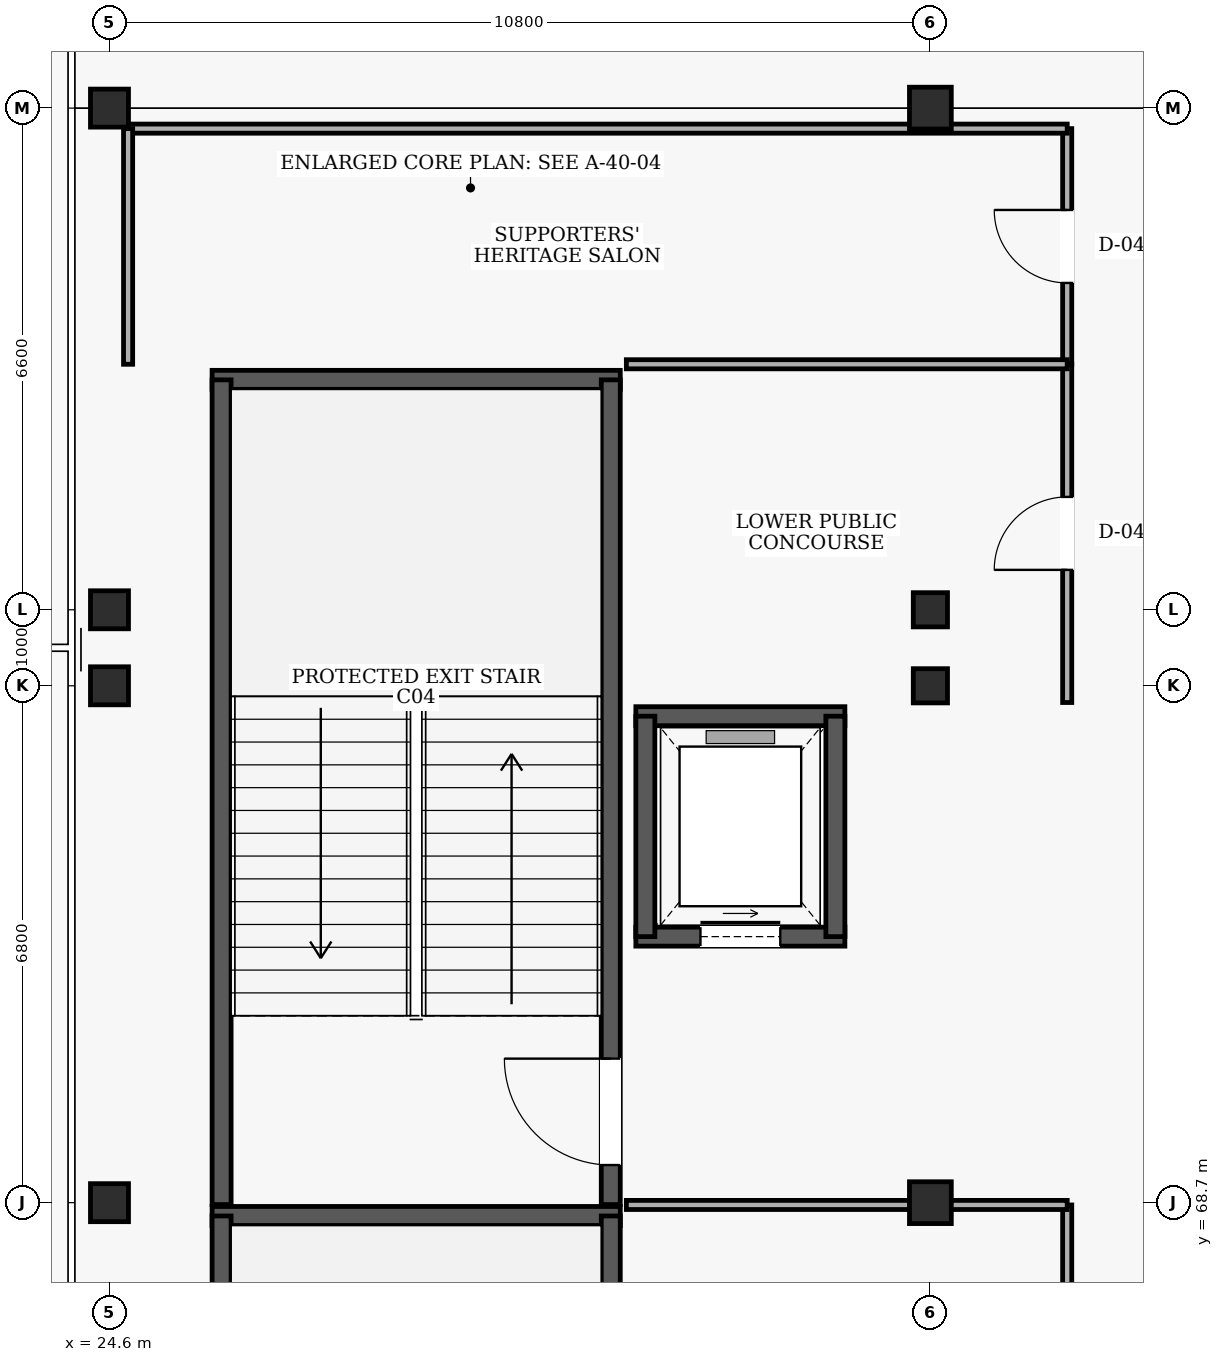
"""IFC4 building model, lengths in metres.
Left out: names, types, materials, properties, quantities, classifications, styles, units other than length and angle.
Written with IfcOpenShell. Run it as: python <this file> out.ifc"""

import sys

from ifc_helpers import new_model, si_unit, direction, frame, frame_2d, origin, origin_2d, place, context, subcontext, project, spatial, rectangle, extrude, element, fill, save


model = new_model("IFC4")
c1 = context("Model", 3, precision=1e-05, world=origin(), true_north=direction((0.0, 1.0)))
c2 = subcontext(c1, "Body", "Model", "MODEL_VIEW")
j1 = project(units=[si_unit("LENGTHUNIT", "METRE"), si_unit("PLANEANGLEUNIT", "RADIAN")], contexts=[c1])
p1 = place(None, origin())
s1 = spatial("IfcSite", under=j1, at=p1, CompositionType="ELEMENT")
p2 = place(p1, origin())
s2 = spatial("IfcBuilding", under=s1, at=p2, CompositionType="ELEMENT")
p3 = place(p2, frame((0.0, 0.0, 5.4)))
s3 = spatial("IfcBuildingStorey", under=s2, at=p3, CompositionType="ELEMENT", Elevation=5.4)
for number, where, z_axis, x_axis in (
    (1, (24.6, 68.7, 0.0), (0.0, 0.0, 1.0), (1.0, 0.0, 0.0)),
    (2, (24.6, 75.5, 0.0), (0.0, 0.0, 1.0), (1.0, 0.0, 0.0)),
    (3, (24.6, 76.5, 0.0), (0.0, 0.0, 1.0), (1.0, 0.0, 0.0)),
    (4, (24.6, 83.1, 0.0), (0.0, 0.0, 1.0), (1.0, 0.0, 0.0)),
):
    element("IfcColumn", number, at=place(p3, frame(where, z_axis=z_axis, x_axis=x_axis)), inside=s3, PredefinedType="COLUMN", context=c2, shape_type="SweptSolid", body=[
        extrude(rectangle(XDim=0.5, YDim=0.5, at=origin_2d()), origin(), (0.0, 0.0, 1.0), 4.8),
    ])
p4 = place(p3, frame((35.4, 68.7, 0.0), z_axis=(0.0, 0.0, 1.0), x_axis=(1.0, 0.0, 0.0)))
e5 = element("IfcColumn", 5, at=p4, inside=s3, PredefinedType="COLUMN", context=c2, shape_type="SweptSolid", body=[
    extrude(rectangle(XDim=0.55, YDim=0.55, at=origin_2d()), origin(), (0.0, 0.0, 1.0), 4.8),
])
for number, where, z_axis, x_axis in (
    (6, (35.4, 75.5, 0.0), (0.0, 0.0, 1.0), (1.0, 0.0, 0.0)),
    (7, (35.4, 76.5, 0.0), (0.0, 0.0, 1.0), (1.0, 0.0, 0.0)),
):
    element("IfcColumn", number, at=place(p3, frame(where, z_axis=z_axis, x_axis=x_axis)), inside=s3, PredefinedType="COLUMN", context=c2, shape_type="SweptSolid", body=[
        extrude(rectangle(XDim=0.45, YDim=0.45, at=origin_2d()), origin(), (0.0, 0.0, 1.0), 4.8),
    ])
p5 = place(p3, frame((35.4, 83.1, 0.0), z_axis=(0.0, 0.0, 1.0), x_axis=(1.0, 0.0, 0.0)))
e8 = element("IfcColumn", 8, at=p5, inside=s3, PredefinedType="COLUMN", context=c2, shape_type="SweptSolid", body=[
    extrude(rectangle(XDim=0.55, YDim=0.55, at=origin_2d()), origin(), (0.0, 0.0, 1.0), 4.8),
])
p6 = place(p3, frame((31.32, 68.525, 0.0), z_axis=(0.0, 0.0, 1.0), x_axis=(-1.0, 0.0, 0.0)))
e9 = element("IfcWall", 9, at=p6, inside=s3, PredefinedType="SHEAR", context=c2, shape_type="SweptSolid", body=[
    extrude(rectangle(XDim=5.37, YDim=0.25, at=frame_2d((2.685, 0.0))), origin(), (0.0, 0.0, 1.0), 4.5),
])
p7 = place(p3, frame((26.075, 57.675, 0.0), z_axis=(0.0, 0.0, 1.0), x_axis=(0.0, 1.0, 0.0)))
e10 = element("IfcWall", 10, at=p7, inside=s3, PredefinedType="SHEAR", context=c2, shape_type="SweptSolid", body=[
    extrude(rectangle(XDim=10.85, YDim=0.25, at=frame_2d((5.425, 0.0))), origin(), (0.0, 0.0, 1.0), 4.5),
])
p8 = place(p3, frame((31.195, 57.675, 0.0), z_axis=(0.0, 0.0, 1.0), x_axis=(0.0, 1.0, 0.0)))
e11 = element("IfcWall", 11, at=p8, inside=s3, PredefinedType="SHEAR", context=c2, shape_type="SweptSolid", body=[
    extrude(rectangle(XDim=10.85, YDim=0.25, at=frame_2d((5.425, 0.0))), origin(), (0.0, 0.0, 1.0), 4.5),
])
p9 = place(p8, frame((0.52, 0.0, 0.0)))
e12 = element("IfcOpeningElement", 12, at=p9, cuts=e11, PredefinedType="OPENING", context=c2, shape_type="SweptSolid", body=[
    extrude(rectangle(XDim=1.4, YDim=2.15, at=frame_2d((0.7, 1.075))), frame((0.0, 0.135, 0.0), z_axis=(0.0, -1.0, 0.0), x_axis=(1.0, 0.0, 0.0)), (0.0, 0.0, 1.0), 0.27),
])
p10 = place(p3, frame((31.32, 79.525, 0.0), z_axis=(0.0, 0.0, 1.0), x_axis=(-1.0, 0.0, 0.0)))
e13 = element("IfcWall", 13, at=p10, inside=s3, PredefinedType="SHEAR", context=c2, shape_type="SweptSolid", body=[
    extrude(rectangle(XDim=5.37, YDim=0.25, at=frame_2d((2.685, 0.0))), origin(), (0.0, 0.0, 1.0), 4.5),
])
p11 = place(p3, frame((26.075, 68.675, 0.0), z_axis=(0.0, 0.0, 1.0), x_axis=(0.0, 1.0, 0.0)))
e14 = element("IfcWall", 14, at=p11, inside=s3, PredefinedType="SHEAR", context=c2, shape_type="SweptSolid", body=[
    extrude(rectangle(XDim=10.85, YDim=0.25, at=frame_2d((5.425, 0.0))), origin(), (0.0, 0.0, 1.0), 4.5),
])
p12 = place(p3, frame((31.195, 68.675, 0.0), z_axis=(0.0, 0.0, 1.0), x_axis=(0.0, 1.0, 0.0)))
e15 = element("IfcWall", 15, at=p12, inside=s3, PredefinedType="SHEAR", context=c2, shape_type="SweptSolid", body=[
    extrude(rectangle(XDim=10.85, YDim=0.25, at=frame_2d((5.425, 0.0))), origin(), (0.0, 0.0, 1.0), 4.5),
])
p13 = place(p12, frame((0.52, 0.0, 0.0)))
e16 = element("IfcOpeningElement", 16, at=p13, cuts=e15, PredefinedType="OPENING", context=c2, shape_type="SweptSolid", body=[
    extrude(rectangle(XDim=1.4, YDim=2.15, at=frame_2d((0.7, 1.075))), frame((0.0, 0.135, 0.0), z_axis=(0.0, -1.0, 0.0), x_axis=(1.0, 0.0, 0.0)), (0.0, 0.0, 1.0), 0.27),
])
p14 = place(p3, frame((31.525, 72.2, 0.0), z_axis=(0.0, 0.0, 1.0), x_axis=(1.0, 0.0, 0.0)))
e17 = element("IfcWall", 17, at=p14, inside=s3, PredefinedType="SHEAR", context=c2, shape_type="SweptSolid", body=[
    extrude(rectangle(XDim=2.75, YDim=0.25, at=frame_2d((1.375, 0.0))), origin(), (0.0, 0.0, 1.0), 4.5),
])
p15 = place(p14, frame((0.85, 0.0, 0.0)))
e18 = element("IfcOpeningElement", 18, at=p15, cuts=e17, PredefinedType="OPENING", context=c2, shape_type="SweptSolid", body=[
    extrude(rectangle(XDim=1.05, YDim=2.15, at=frame_2d((0.525, 1.075))), frame((0.0, 0.135, 0.0), z_axis=(0.0, -1.0, 0.0), x_axis=(1.0, 0.0, 0.0)), (0.0, 0.0, 1.0), 0.27),
])
p16 = place(p3, frame((34.275, 75.1, 0.0), z_axis=(0.0, 0.0, 1.0), x_axis=(-1.0, 0.0, 0.0)))
e19 = element("IfcWall", 19, at=p16, inside=s3, PredefinedType="SHEAR", context=c2, shape_type="SweptSolid", body=[
    extrude(rectangle(XDim=2.75, YDim=0.25, at=frame_2d((1.375, 0.0))), origin(), (0.0, 0.0, 1.0), 4.5),
])
for number, where, z_axis, x_axis in (
    (20, (31.65, 75.1, 0.0), (0.0, 0.0, 1.0), (0.0, -1.0, 0.0)),
    (21, (34.15, 72.2, 0.0), (0.0, 0.0, 1.0), (0.0, 1.0, 0.0)),
):
    element("IfcWall", number, at=place(p3, frame(where, z_axis=z_axis, x_axis=x_axis)), inside=s3, PredefinedType="SHEAR", context=c2, shape_type="SweptSolid", body=[
        extrude(rectangle(XDim=2.9, YDim=0.25, at=frame_2d((1.45, 0.0))), origin(), (0.0, 0.0, 1.0), 4.5),
    ])
p17 = place(p3, frame((37.2, 64.28, 0.0), z_axis=(0.0, 0.0, 1.0), x_axis=(0.0, 1.0, 0.0)))
e22 = element("IfcWall", 22, at=p17, inside=s3, PredefinedType="PARTITIONING", context=c2, shape_type="SweptSolid", body=[
    extrude(rectangle(XDim=4.39, YDim=0.12, at=frame_2d((2.195, 0.0))), origin(), (0.0, 0.0, 1.0), 4.5),
])
p18 = place(p17, frame((1.155, 0.0, 0.0)))
e23 = element("IfcOpeningElement", 23, at=p18, cuts=e22, PredefinedType="OPENING", context=c2, shape_type="SweptSolid", body=[
    extrude(rectangle(XDim=2.08, YDim=2.35, at=frame_2d((1.04, 1.175))), frame((0.0, 0.07, 0.0), z_axis=(0.0, -1.0, 0.0), x_axis=(1.0, 0.0, 0.0)), (0.0, 0.0, 1.0), 0.14),
])
p19 = place(p3, frame((37.2, 68.67, 0.0), z_axis=(0.0, 0.0, 1.0), x_axis=(-1.0, 0.0, 0.0)))
e24 = element("IfcWall", 24, at=p19, inside=s3, PredefinedType="PARTITIONING", context=c2, shape_type="SweptSolid", body=[
    extrude(rectangle(XDim=5.8, YDim=0.12, at=frame_2d((2.9, 0.0))), origin(), (0.0, 0.0, 1.0), 3.58),
])
p20 = place(p3, frame((37.2, 79.73, 0.0), z_axis=(0.0, 0.0, 1.0), x_axis=(0.0, 1.0, 0.0)))
e25 = element("IfcWall", 25, at=p20, inside=s3, PredefinedType="PARTITIONING", context=c2, shape_type="SweptSolid", body=[
    extrude(rectangle(XDim=3.1, YDim=0.12, at=frame_2d((1.55, 0.0))), origin(), (0.0, 0.0, 1.0), 4.5),
])
p21 = place(p20, frame((1.07, 0.0, 0.0)))
e26 = element("IfcOpeningElement", 26, at=p21, cuts=e25, PredefinedType="OPENING", context=c2, shape_type="SweptSolid", body=[
    extrude(rectangle(XDim=0.96, YDim=2.1, at=frame_2d((0.48, 1.05))), frame((0.0, 0.07, 0.0), z_axis=(0.0, -1.0, 0.0), x_axis=(1.0, 0.0, 0.0)), (0.0, 0.0, 1.0), 0.14),
])
p22 = place(p3, frame((37.2, 82.83, 0.0), z_axis=(0.0, 0.0, 1.0), x_axis=(-1.0, 0.0, 0.0)))
e27 = element("IfcWall", 27, at=p22, inside=s3, PredefinedType="PARTITIONING", context=c2, shape_type="SweptSolid", body=[
    extrude(rectangle(XDim=12.355, YDim=0.12, at=frame_2d((6.177, 0.0))), origin(), (0.0, 0.0, 1.0), 3.58),
])
p23 = place(p3, frame((24.845, 82.83, 0.0), z_axis=(0.0, 0.0, 1.0), x_axis=(0.0, -1.0, 0.0)))
e28 = element("IfcWall", 28, at=p23, inside=s3, PredefinedType="PARTITIONING", context=c2, shape_type="SweptSolid", body=[
    extrude(rectangle(XDim=3.1, YDim=0.12, at=frame_2d((1.55, 0.0))), origin(), (0.0, 0.0, 1.0), 3.98),
])
p24 = place(p3, frame((37.2, 75.28, 0.0), z_axis=(0.0, 0.0, 1.0), x_axis=(0.0, 1.0, 0.0)))
e29 = element("IfcWall", 29, at=p24, inside=s3, PredefinedType="PARTITIONING", context=c2, shape_type="SweptSolid", body=[
    extrude(rectangle(XDim=4.45, YDim=0.12, at=frame_2d((2.225, 0.0))), origin(), (0.0, 0.0, 1.0), 4.5),
])
p25 = place(p24, frame((1.745, 0.0, 0.0)))
e30 = element("IfcOpeningElement", 30, at=p25, cuts=e29, PredefinedType="OPENING", context=c2, shape_type="SweptSolid", body=[
    extrude(rectangle(XDim=0.96, YDim=2.1, at=frame_2d((0.48, 1.05))), frame((0.0, 0.07, 0.0), z_axis=(0.0, -1.0, 0.0), x_axis=(1.0, 0.0, 0.0)), (0.0, 0.0, 1.0), 0.14),
])
p26 = place(p3, frame((37.2, 79.73, 0.0), z_axis=(0.0, 0.0, 1.0), x_axis=(-1.0, 0.0, 0.0)))
e31 = element("IfcWall", 31, at=p26, inside=s3, PredefinedType="PARTITIONING", context=c2, shape_type="SweptSolid", body=[
    extrude(rectangle(XDim=5.8, YDim=0.12, at=frame_2d((2.9, 0.0))), origin(), (0.0, 0.0, 1.0), 4.5),
])
p27 = place(p13, origin())
e32 = element("IfcDoor", 32, at=p27, inside=s3, OperationType="SINGLE_SWING_RIGHT", PredefinedType="DOOR", context=c2, shape_type="SweptSolid", body=[
    extrude(rectangle(XDim=1.4, YDim=2.15, at=frame_2d((0.7, 1.075))), frame((0.0, 0.025, 0.0), z_axis=(0.0, -1.0, 0.0), x_axis=(1.0, 0.0, 0.0)), (0.0, 0.0, 1.0), 0.05),
])
fill(e16, e32)
p28 = place(p15, origin())
e33 = element("IfcDoor", 33, at=p28, inside=s3, OperationType="SLIDING_TO_LEFT", PredefinedType="DOOR", context=c2, shape_type="SweptSolid", body=[
    extrude(rectangle(XDim=1.05, YDim=2.15, at=frame_2d((0.525, 1.075))), frame((0.0, 0.025, 0.0), z_axis=(0.0, -1.0, 0.0), x_axis=(1.0, 0.0, 0.0)), (0.0, 0.0, 1.0), 0.05),
])
fill(e18, e33)
p29 = place(p21, origin())
e34 = element("IfcDoor", 34, at=p29, inside=s3, OperationType="SINGLE_SWING_RIGHT", PredefinedType="DOOR", context=c2, shape_type="SweptSolid", body=[
    extrude(rectangle(XDim=0.96, YDim=2.1, at=frame_2d((0.48, 1.05))), frame((0.0, 0.025, 0.0), z_axis=(0.0, -1.0, 0.0), x_axis=(1.0, 0.0, 0.0)), (0.0, 0.0, 1.0), 0.05),
])
fill(e26, e34)
p30 = place(p25, origin())
e35 = element("IfcDoor", 35, at=p30, inside=s3, OperationType="SINGLE_SWING_LEFT", PredefinedType="DOOR", context=c2, shape_type="SweptSolid", body=[
    extrude(rectangle(XDim=0.96, YDim=2.1, at=frame_2d((0.48, 1.05))), frame((0.0, 0.025, 0.0), z_axis=(0.0, -1.0, 0.0), x_axis=(1.0, 0.0, 0.0)), (0.0, 0.0, 1.0), 0.05),
])
fill(e30, e35)
save(model, sys.argv[1])
